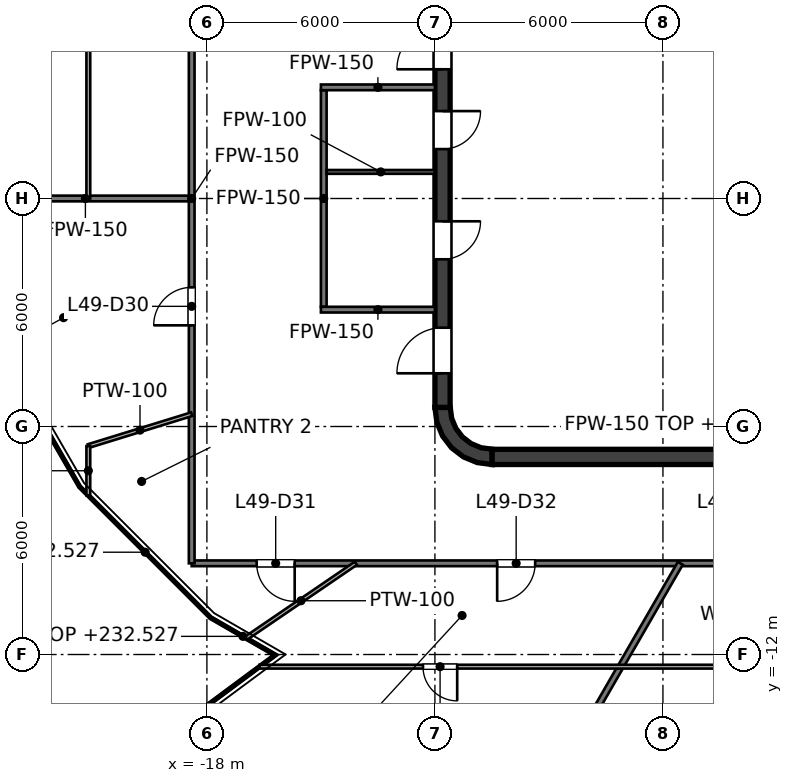
"""IFC4 building model, lengths in metres.
Left out: names, types, materials, properties, quantities, classifications, styles, units other than length and angle.
Written with IfcOpenShell. Run it as: python <this file> out.ifc"""

import sys

from ifc_helpers import new_model, si_unit, direction, frame, frame_2d, origin, place, context, subcontext, project, spatial, polyline, rectangle, outline, extrude, element, fill, save


model = new_model("IFC4")
c1 = context("Model", 3, precision=1e-05, world=origin(), true_north=direction((0.0, 1.0)))
c2 = subcontext(c1, "Body", "Model", "MODEL_VIEW")
j1 = project(units=[si_unit("LENGTHUNIT", "METRE"), si_unit("PLANEANGLEUNIT", "RADIAN")], contexts=[c1])
p1 = place(None, origin())
s1 = spatial("IfcSite", under=j1, at=p1, CompositionType="ELEMENT")
p2 = place(p1, origin())
s2 = spatial("IfcBuilding", under=s1, at=p2, CompositionType="ELEMENT")
p3 = place(p2, frame((0.0, 0.0, 229.6)))
s3 = spatial("IfcBuildingStorey", under=s2, at=p3, CompositionType="ELEMENT", Elevation=229.6)
p4 = place(p3, frame((-10.5, -6.8, 0.0), z_axis=(0.0, 0.0, 1.0), x_axis=(1.0, 0.0, 0.0)))
e1 = element("IfcWall", 1, at=p4, inside=s3, PredefinedType="SHEAR", context=c2, shape_type="SweptSolid", body=[
    extrude(rectangle(XDim=21.0, YDim=0.4, at=frame_2d((10.5, 0.0))), origin(), (0.0, 0.0, 1.0), 4.0),
])
p5 = place(p3, frame((-11.8, -5.5, 0.0), z_axis=(0.0, 0.0, 1.0), x_axis=(0.0, 1.0, 0.0)))
e2 = element("IfcWall", 2, at=p5, inside=s3, PredefinedType="SHEAR", context=c2, shape_type="SweptSolid", body=[
    extrude(rectangle(XDim=11.0, YDim=0.4, at=frame_2d((5.5, 0.0))), origin(), (0.0, 0.0, 1.0), 4.0),
])
p6 = place(p5, frame((3.9, 0.0, 0.0)))
e3 = element("IfcOpeningElement", 3, at=p6, cuts=e2, PredefinedType="OPENING", context=c2, shape_type="SweptSolid", body=[
    extrude(rectangle(XDim=1.0, YDim=2.1, at=frame_2d((0.5, 1.05))), frame((0.0, 0.2, 0.0), z_axis=(0.0, -1.0, 0.0), x_axis=(1.0, 0.0, 0.0)), (0.0, 0.0, 1.0), 0.4),
])
p7 = place(p5, frame((6.8, 0.0, 0.0)))
e4 = element("IfcOpeningElement", 4, at=p7, cuts=e2, PredefinedType="OPENING", context=c2, shape_type="SweptSolid", body=[
    extrude(rectangle(XDim=1.0, YDim=2.1, at=frame_2d((0.5, 1.05))), frame((0.0, 0.2, 0.0), z_axis=(0.0, -1.0, 0.0), x_axis=(1.0, 0.0, 0.0)), (0.0, 0.0, 1.0), 0.4),
])
p8 = place(p5, frame((0.9, 0.0, 0.0)))
e5 = element("IfcOpeningElement", 5, at=p8, cuts=e2, PredefinedType="OPENING", context=c2, shape_type="SweptSolid", body=[
    extrude(rectangle(XDim=1.2, YDim=2.1, at=frame_2d((0.6, 1.05))), frame((0.0, 0.2, 0.0), z_axis=(0.0, -1.0, 0.0), x_axis=(1.0, 0.0, 0.0)), (0.0, 0.0, 1.0), 0.4),
])
p9 = place(p5, frame((8.9, 0.0, 0.0)))
e6 = element("IfcOpeningElement", 6, at=p9, cuts=e2, PredefinedType="OPENING", context=c2, shape_type="SweptSolid", body=[
    extrude(rectangle(XDim=1.2, YDim=2.1, at=frame_2d((0.6, 1.05))), frame((0.0, 0.2, 0.0), z_axis=(0.0, -1.0, 0.0), x_axis=(1.0, 0.0, 0.0)), (0.0, 0.0, 1.0), 0.4),
])
p10 = place(p3, origin())
e7 = element("IfcWall", 7, at=p10, inside=s3, PredefinedType="SHEAR", context=c2, shape_type="SweptSolid", body=[
    extrude(outline(polyline([(-10.5, -7.0), (-10.5, -6.596), (-10.784, -6.559), (-11.048, -6.45), (-11.275, -6.275), (-11.45, -6.048), (-11.559, -5.784), (-11.596, -5.5), (-12.0, -5.5), (-11.949, -5.888), (-11.799, -6.25), (-11.561, -6.561), (-11.25, -6.799), (-10.888, -6.949), (-10.5, -7.0)])), origin(), (0.0, 0.0, 1.0), 4.0),
])
p11 = place(p3, frame((-9.0, -6.6, 0.0), z_axis=(0.0, 0.0, 1.0), x_axis=(0.0, 1.0, 0.0)))
e8 = element("IfcWall", 8, at=p11, inside=s3, PredefinedType="PARTITIONING", context=c2, shape_type="SweptSolid", body=[
    extrude(rectangle(XDim=2.5, YDim=0.25, at=frame_2d((1.25, 0.0))), origin(), (0.0, 0.0, 1.0), 3.85),
])
p12 = place(p11, frame((0.75, 0.0, 0.0)))
e9 = element("IfcOpeningElement", 9, at=p12, cuts=e8, PredefinedType="OPENING", context=c2, shape_type="SweptSolid", body=[
    extrude(rectangle(XDim=1.0, YDim=2.1, at=frame_2d((0.5, 1.05))), frame((0.0, 0.125, 0.0), z_axis=(0.0, -1.0, 0.0), x_axis=(1.0, 0.0, 0.0)), (0.0, 0.0, 1.0), 0.25),
])
p13 = place(p3, frame((-9.125, 1.525, 0.0), z_axis=(0.0, 0.0, 1.0), x_axis=(1.0, 0.0, 0.0)))
e10 = element("IfcWall", 10, at=p13, inside=s3, PredefinedType="SOLIDWALL", context=c2, shape_type="SweptSolid", body=[
    extrude(rectangle(XDim=8.35, YDim=0.25, at=frame_2d((4.175, 0.0))), origin(), (0.0, 0.0, 1.0), 3.85),
])
p14 = place(p13, frame((0.925, 0.0, 0.0)))
e11 = element("IfcOpeningElement", 11, at=p14, cuts=e10, PredefinedType="OPENING", context=c2, shape_type="SweptSolid", body=[
    extrude(rectangle(XDim=1.1, YDim=2.1, at=frame_2d((0.55, 1.05))), frame((0.0, 0.125, 0.0), z_axis=(0.0, -1.0, 0.0), x_axis=(1.0, 0.0, 0.0)), (0.0, 0.0, 1.0), 0.25),
])
p15 = place(p13, frame((3.625, 0.0, 0.0)))
e12 = element("IfcOpeningElement", 12, at=p15, cuts=e10, PredefinedType="OPENING", context=c2, shape_type="SweptSolid", body=[
    extrude(rectangle(XDim=1.1, YDim=2.1, at=frame_2d((0.55, 1.05))), frame((0.0, 0.125, 0.0), z_axis=(0.0, -1.0, 0.0), x_axis=(1.0, 0.0, 0.0)), (0.0, 0.0, 1.0), 0.25),
])
p16 = place(p13, frame((6.325, 0.0, 0.0)))
e13 = element("IfcOpeningElement", 13, at=p16, cuts=e10, PredefinedType="OPENING", context=c2, shape_type="SweptSolid", body=[
    extrude(rectangle(XDim=1.1, YDim=2.1, at=frame_2d((0.55, 1.05))), frame((0.0, 0.125, 0.0), z_axis=(0.0, -1.0, 0.0), x_axis=(1.0, 0.0, 0.0)), (0.0, 0.0, 1.0), 0.25),
])
for number, where, z_axis, x_axis in (
    (14, (-9.0, 1.65, 0.0), (0.0, 0.0, 1.0), (0.0, 1.0, 0.0)),
    (15, (-6.3, 1.65, 0.0), (0.0, 0.0, 1.0), (0.0, 1.0, 0.0)),
):
    element("IfcWall", number, at=place(p3, frame(where, z_axis=z_axis, x_axis=x_axis)), inside=s3, PredefinedType="SOLIDWALL", context=c2, shape_type="SweptSolid", body=[
        extrude(rectangle(XDim=2.2, YDim=0.25, at=frame_2d((1.1, 0.0))), origin(), (0.0, 0.0, 1.0), 3.85),
    ])
p17 = place(p3, frame((-9.125, -1.525, 0.0), z_axis=(0.0, 0.0, 1.0), x_axis=(1.0, 0.0, 0.0)))
e16 = element("IfcWall", 16, at=p17, inside=s3, PredefinedType="SOLIDWALL", context=c2, shape_type="SweptSolid", body=[
    extrude(rectangle(XDim=18.25, YDim=0.25, at=frame_2d((9.125, 0.0))), origin(), (0.0, 0.0, 1.0), 3.85),
])
p18 = place(p17, frame((7.15, 0.0, 0.0)))
e17 = element("IfcOpeningElement", 17, at=p18, cuts=e16, PredefinedType="OPENING", context=c2, shape_type="SweptSolid", body=[
    extrude(rectangle(XDim=1.2, YDim=2.1, at=frame_2d((0.6, 1.05))), frame((0.0, 0.125, 0.0), z_axis=(0.0, -1.0, 0.0), x_axis=(1.0, 0.0, 0.0)), (0.0, 0.0, 1.0), 0.25),
])
p19 = place(p17, frame((10.2, 0.0, 0.0)))
e18 = element("IfcOpeningElement", 18, at=p19, cuts=e16, PredefinedType="OPENING", context=c2, shape_type="SweptSolid", body=[
    extrude(rectangle(XDim=1.2, YDim=2.1, at=frame_2d((0.6, 1.05))), frame((0.0, 0.125, 0.0), z_axis=(0.0, -1.0, 0.0), x_axis=(1.0, 0.0, 0.0)), (0.0, 0.0, 1.0), 0.25),
])
p20 = place(p17, frame((16.075, 0.0, 0.0)))
e19 = element("IfcOpeningElement", 19, at=p20, cuts=e16, PredefinedType="OPENING", context=c2, shape_type="SweptSolid", body=[
    extrude(rectangle(XDim=1.0, YDim=2.1, at=frame_2d((0.5, 1.05))), frame((0.0, 0.125, 0.0), z_axis=(0.0, -1.0, 0.0), x_axis=(1.0, 0.0, 0.0)), (0.0, 0.0, 1.0), 0.25),
])
p21 = place(p3, frame((-9.125, -3.975, 0.0), z_axis=(0.0, 0.0, 1.0), x_axis=(1.0, 0.0, 0.0)))
e20 = element("IfcWall", 20, at=p21, inside=s3, PredefinedType="SOLIDWALL", context=c2, shape_type="SweptSolid", body=[
    extrude(rectangle(XDim=12.4, YDim=0.25, at=frame_2d((6.2, 0.0))), origin(), (0.0, 0.0, 1.0), 3.85),
])
p22 = place(p21, frame((1.05, 0.0, 0.0)))
e21 = element("IfcOpeningElement", 21, at=p22, cuts=e20, PredefinedType="OPENING", context=c2, shape_type="SweptSolid", body=[
    extrude(rectangle(XDim=1.2, YDim=2.1, at=frame_2d((0.6, 1.05))), frame((0.0, 0.125, 0.0), z_axis=(0.0, -1.0, 0.0), x_axis=(1.0, 0.0, 0.0)), (0.0, 0.0, 1.0), 0.25),
])
p23 = place(p21, frame((4.1, 0.0, 0.0)))
e22 = element("IfcOpeningElement", 22, at=p23, cuts=e20, PredefinedType="OPENING", context=c2, shape_type="SweptSolid", body=[
    extrude(rectangle(XDim=1.2, YDim=2.1, at=frame_2d((0.6, 1.05))), frame((0.0, 0.125, 0.0), z_axis=(0.0, -1.0, 0.0), x_axis=(1.0, 0.0, 0.0)), (0.0, 0.0, 1.0), 0.25),
])
for number, where, z_axis, x_axis in (
    (23, (-9.0, -3.85, 0.0), (0.0, 0.0, 1.0), (0.0, 1.0, 0.0)),
    (24, (-5.95, -3.85, 0.0), (0.0, 0.0, 1.0), (0.0, 1.0, 0.0)),
):
    element("IfcWall", number, at=place(p3, frame(where, z_axis=z_axis, x_axis=x_axis)), inside=s3, PredefinedType="SOLIDWALL", context=c2, shape_type="SweptSolid", body=[
        extrude(rectangle(XDim=2.2, YDim=0.25, at=frame_2d((1.1, 0.0))), origin(), (0.0, 0.0, 1.0), 3.85),
    ])
p24 = place(p3, frame((-14.925, -2.85, 0.0), z_axis=(0.0, 0.0, 1.0), x_axis=(0.0, 1.0, 0.0)))
e25 = element("IfcWall", 25, at=p24, inside=s3, PredefinedType="PARTITIONING", context=c2, shape_type="SweptSolid", body=[
    extrude(rectangle(XDim=5.7, YDim=0.15, at=frame_2d((2.85, 0.0))), origin(), (0.0, 0.0, 1.0), 2.918),
])
for number, where, z_axis, x_axis in (
    (26, (-15.0, 2.925, 0.0), (0.0, 0.0, 1.0), (1.0, 0.0, 0.0)),
    (27, (-15.0, -2.925, 0.0), (0.0, 0.0, 1.0), (1.0, 0.0, 0.0)),
):
    element("IfcWall", number, at=place(p3, frame(where, z_axis=z_axis, x_axis=x_axis)), inside=s3, PredefinedType="PARTITIONING", context=c2, shape_type="SweptSolid", body=[
        extrude(rectangle(XDim=3.0, YDim=0.15, at=frame_2d((1.5, 0.0))), origin(), (0.0, 0.0, 1.0), 2.918),
    ])
p25 = place(p3, frame((-14.85, 0.7, 0.0), z_axis=(0.0, 0.0, 1.0), x_axis=(1.0, 0.0, 0.0)))
e28 = element("IfcWall", 28, at=p25, inside=s3, PredefinedType="PARTITIONING", context=c2, shape_type="SweptSolid", body=[
    extrude(rectangle(XDim=2.85, YDim=0.1, at=frame_2d((1.425, 0.0))), origin(), (0.0, 0.0, 1.0), 2.918),
])
p26 = place(p3, frame((-18.4, -9.6, 0.0), z_axis=(0.0, 0.0, 1.0), x_axis=(1.0, 0.0, 0.0)))
e29 = element("IfcWall", 29, at=p26, inside=s3, PredefinedType="PARTITIONING", context=c2, shape_type="SweptSolid", body=[
    extrude(rectangle(XDim=36.8, YDim=0.15, at=frame_2d((18.4, 0.0))), origin(), (0.0, 0.0, 1.0), 2.927),
])
p27 = place(p26, frame((13.866, 0.0, 0.0)))
e30 = element("IfcOpeningElement", 30, at=p27, cuts=e29, PredefinedType="OPENING", context=c2, shape_type="SweptSolid", body=[
    extrude(rectangle(XDim=1.0, YDim=2.1, at=frame_2d((0.5, 1.05))), frame((0.0, 0.075, 0.0), z_axis=(0.0, -1.0, 0.0), x_axis=(1.0, 0.0, 0.0)), (0.0, 0.0, 1.0), 0.15),
])
p28 = place(p26, frame((18.999, 0.0, 0.0)))
e31 = element("IfcOpeningElement", 31, at=p28, cuts=e29, PredefinedType="OPENING", context=c2, shape_type="SweptSolid", body=[
    extrude(rectangle(XDim=1.0, YDim=2.1, at=frame_2d((0.5, 1.05))), frame((0.0, 0.075, 0.0), z_axis=(0.0, -1.0, 0.0), x_axis=(1.0, 0.0, 0.0)), (0.0, 0.0, 1.0), 0.15),
])
p29 = place(p26, frame((25.061, 0.0, 0.0)))
e32 = element("IfcOpeningElement", 32, at=p29, cuts=e29, PredefinedType="OPENING", context=c2, shape_type="SweptSolid", body=[
    extrude(rectangle(XDim=1.0, YDim=2.1, at=frame_2d((0.5, 1.05))), frame((0.0, 0.075, 0.0), z_axis=(0.0, -1.0, 0.0), x_axis=(1.0, 0.0, 0.0)), (0.0, 0.0, 1.0), 0.15),
])
p30 = place(p26, frame((31.951, 0.0, 0.0)))
e33 = element("IfcOpeningElement", 33, at=p30, cuts=e29, PredefinedType="OPENING", context=c2, shape_type="SweptSolid", body=[
    extrude(rectangle(XDim=1.0, YDim=2.1, at=frame_2d((0.5, 1.05))), frame((0.0, 0.075, 0.0), z_axis=(0.0, -1.0, 0.0), x_axis=(1.0, 0.0, 0.0)), (0.0, 0.0, 1.0), 0.15),
])
p31 = place(p26, frame((1.71, 0.0, 0.0)))
e34 = element("IfcOpeningElement", 34, at=p31, cuts=e29, PredefinedType="OPENING", context=c2, shape_type="SweptSolid", body=[
    extrude(rectangle(XDim=1.0, YDim=2.1, at=frame_2d((0.5, 1.05))), frame((0.0, 0.075, 0.0), z_axis=(0.0, -1.0, 0.0), x_axis=(1.0, 0.0, 0.0)), (0.0, 0.0, 1.0), 0.15),
])
p32 = place(p26, frame((8.038, 0.0, 0.0)))
e35 = element("IfcOpeningElement", 35, at=p32, cuts=e29, PredefinedType="OPENING", context=c2, shape_type="SweptSolid", body=[
    extrude(rectangle(XDim=1.0, YDim=2.1, at=frame_2d((0.5, 1.05))), frame((0.0, 0.075, 0.0), z_axis=(0.0, -1.0, 0.0), x_axis=(1.0, 0.0, 0.0)), (0.0, 0.0, 1.0), 0.15),
])
p33 = place(p3, frame((-23.994, 0.0, 0.0), z_axis=(0.0, 0.0, 1.0), x_axis=(1.0, 0.0, 0.0)))
e36 = element("IfcWall", 36, at=p33, inside=s3, PredefinedType="PARTITIONING", context=c2, shape_type="SweptSolid", body=[
    extrude(rectangle(XDim=5.594, YDim=0.15, at=frame_2d((2.797, 0.0))), origin(), (0.0, 0.0, 1.0), 2.918),
])
p34 = place(p3, frame((-12.15, -21.044, 0.0), z_axis=(0.0, 0.0, 1.0), x_axis=(0.499954356739, 0.86605175433, 0.0)))
e37 = element("IfcWall", 37, at=p34, inside=s3, PredefinedType="PARTITIONING", context=c2, shape_type="SweptSolid", body=[
    extrude(rectangle(XDim=13.214, YDim=0.15, at=frame_2d((6.607, 0.0))), origin(), (0.0, 0.0, 1.0), 3.302),
])
p35 = place(p3, frame((-18.4, -9.6, 0.0), z_axis=(0.0, 0.0, 1.0), x_axis=(0.0, 1.0, 0.0)))
e38 = element("IfcWall", 38, at=p35, inside=s3, PredefinedType="PARTITIONING", context=c2, shape_type="SweptSolid", body=[
    extrude(rectangle(XDim=19.2, YDim=0.15, at=frame_2d((9.6, 0.0))), origin(), (0.0, 0.0, 1.0), 2.918),
])
p36 = place(p35, frame((13.849, 0.0, 0.0)))
e39 = element("IfcOpeningElement", 39, at=p36, cuts=e38, PredefinedType="OPENING", context=c2, shape_type="SweptSolid", body=[
    extrude(rectangle(XDim=1.0, YDim=2.1, at=frame_2d((0.5, 1.05))), frame((0.0, 0.075, 0.0), z_axis=(0.0, -1.0, 0.0), x_axis=(1.0, 0.0, 0.0)), (0.0, 0.0, 1.0), 0.15),
])
p37 = place(p35, frame((6.262, 0.0, 0.0)))
e40 = element("IfcOpeningElement", 40, at=p37, cuts=e38, PredefinedType="OPENING", context=c2, shape_type="SweptSolid", body=[
    extrude(rectangle(XDim=1.0, YDim=2.1, at=frame_2d((0.5, 1.05))), frame((0.0, 0.075, 0.0), z_axis=(0.0, -1.0, 0.0), x_axis=(1.0, 0.0, 0.0)), (0.0, 0.0, 1.0), 0.15),
])
p38 = place(p3, frame((-23.204, -4.371, 0.0), z_axis=(0.0, 0.0, 1.0), x_axis=(0.500003477455, -0.866023396066, 0.0)))
e41 = element("IfcWall", 41, at=p38, inside=s3, PredefinedType="PARTITIONING", context=c2, shape_type="SweptSolid", body=[
    extrude(rectangle(XDim=3.71, YDim=0.05, at=frame_2d((1.855, 0.0))), origin(), (0.0, 0.0, 1.0), 2.918),
])
p39 = place(p3, frame((-21.349, -7.584, 0.0), z_axis=(0.0, 0.0, 1.0), x_axis=(0.70713181373, -0.707081747757, 0.0)))
e42 = element("IfcWall", 42, at=p39, inside=s3, PredefinedType="PARTITIONING", context=c2, shape_type="SweptSolid", body=[
    extrude(rectangle(XDim=4.876, YDim=0.05, at=frame_2d((2.438, 0.0))), origin(), (0.0, 0.0, 1.0), 2.927),
])
p40 = place(p3, frame((-17.901, -11.032, 0.0), z_axis=(0.0, 0.0, 1.0), x_axis=(0.866137951632, -0.499805010722, 0.0)))
e43 = element("IfcWall", 43, at=p40, inside=s3, PredefinedType="PARTITIONING", context=c2, shape_type="SweptSolid", body=[
    extrude(rectangle(XDim=1.963, YDim=0.05, at=frame_2d((0.981, 0.0))), origin(), (0.0, 0.0, 1.0), 2.927),
])
p41 = place(p3, frame((-21.892, -16.233, 0.0), z_axis=(0.0, 0.0, 1.0), x_axis=(0.803267144232, 0.595618917595, 0.0)))
e44 = element("IfcWall", 44, at=p41, inside=s3, PredefinedType="PARTITIONING", context=c2, shape_type="SweptSolid", body=[
    extrude(rectangle(XDim=7.085, YDim=0.05, at=frame_2d((3.542, 0.0))), origin(), (0.0, 0.0, 1.0), 2.927),
])
p42 = place(p3, frame((-16.615, -12.32, 0.0), z_axis=(0.0, 0.0, 1.0), x_axis=(1.0, 0.0, 0.0)))
e45 = element("IfcWall", 45, at=p42, inside=s3, PredefinedType="PARTITIONING", context=c2, shape_type="SweptSolid", body=[
    extrude(rectangle(XDim=37.735, YDim=0.1, at=frame_2d((18.868, 0.0))), origin(), (0.0, 0.0, 1.0), 2.927),
])
p43 = place(p42, frame((17.19, 0.0, 0.0)))
e46 = element("IfcOpeningElement", 46, at=p43, cuts=e45, PredefinedType="OPENING", context=c2, shape_type="SweptSolid", body=[
    extrude(rectangle(XDim=1.8, YDim=2.1, at=frame_2d((0.9, 1.05))), frame((0.0, 0.05, 0.0), z_axis=(0.0, -1.0, 0.0), x_axis=(1.0, 0.0, 0.0)), (0.0, 0.0, 1.0), 0.1),
])
p44 = place(p42, frame((4.301, 0.0, 0.0)))
e47 = element("IfcOpeningElement", 47, at=p44, cuts=e45, PredefinedType="OPENING", context=c2, shape_type="SweptSolid", body=[
    extrude(rectangle(XDim=0.9, YDim=2.1, at=frame_2d((0.45, 1.05))), frame((0.0, 0.05, 0.0), z_axis=(0.0, -1.0, 0.0), x_axis=(1.0, 0.0, 0.0)), (0.0, 0.0, 1.0), 0.1),
])
p45 = place(p3, frame((-21.12, -6.515, 0.0), z_axis=(0.0, 0.0, 1.0), x_axis=(0.955593380923, 0.294688463189, 0.0)))
e48 = element("IfcWall", 48, at=p45, inside=s3, PredefinedType="PARTITIONING", context=c2, shape_type="SweptSolid", body=[
    extrude(rectangle(XDim=2.847, YDim=0.1, at=frame_2d((1.423, 0.0))), origin(), (0.0, 0.0, 1.0), 3.85),
])
p46 = place(p3, frame((-16.969, -11.57, 0.0), z_axis=(0.0, 0.0, 1.0), x_axis=(0.826104689434, 0.563516674194, 0.0)))
e49 = element("IfcWall", 49, at=p46, inside=s3, PredefinedType="PARTITIONING", context=c2, shape_type="SweptSolid", body=[
    extrude(rectangle(XDim=3.496, YDim=0.1, at=frame_2d((1.748, 0.0))), origin(), (0.0, 0.0, 1.0), 3.85),
])
p47 = place(p3, frame((-21.12, -7.813, 0.0), z_axis=(0.0, 0.0, 1.0), x_axis=(0.0, 1.0, 0.0)))
e50 = element("IfcWall", 50, at=p47, inside=s3, PredefinedType="PARTITIONING", context=c2, shape_type="SweptSolid", body=[
    extrude(rectangle(XDim=1.298, YDim=0.1, at=frame_2d((0.649, 0.0))), origin(), (0.0, 0.0, 1.0), 2.927),
])
p48 = place(p3, frame((-21.12, 0.0, 0.0), z_axis=(0.0, 0.0, 1.0), x_axis=(0.0, 1.0, 0.0)))
e51 = element("IfcWall", 51, at=p48, inside=s3, PredefinedType="PARTITIONING", context=c2, shape_type="SweptSolid", body=[
    extrude(rectangle(XDim=12.32, YDim=0.1, at=frame_2d((6.16, 0.0))), origin(), (0.0, 0.0, 1.0), 2.918),
])
p49 = place(p48, frame((5.21, 0.0, 0.0)))
e52 = element("IfcOpeningElement", 52, at=p49, cuts=e51, PredefinedType="OPENING", context=c2, shape_type="SweptSolid", body=[
    extrude(rectangle(XDim=1.8, YDim=2.1, at=frame_2d((0.9, 1.05))), frame((0.0, 0.05, 0.0), z_axis=(0.0, -1.0, 0.0), x_axis=(1.0, 0.0, 0.0)), (0.0, 0.0, 1.0), 0.1),
])
p50 = place(p14, origin())
e53 = element("IfcDoor", 53, at=p50, inside=s3, OperationType="DOUBLE_DOOR_SLIDING", PredefinedType="DOOR", context=c2, shape_type="SweptSolid", body=[
    extrude(rectangle(XDim=1.1, YDim=2.1, at=frame_2d((0.55, 1.05))), frame((0.0, 0.025, 0.0), z_axis=(0.0, -1.0, 0.0), x_axis=(1.0, 0.0, 0.0)), (0.0, 0.0, 1.0), 0.05),
])
fill(e11, e53)
p51 = place(p15, origin())
e54 = element("IfcDoor", 54, at=p51, inside=s3, OperationType="DOUBLE_DOOR_SLIDING", PredefinedType="DOOR", context=c2, shape_type="SweptSolid", body=[
    extrude(rectangle(XDim=1.1, YDim=2.1, at=frame_2d((0.55, 1.05))), frame((0.0, 0.025, 0.0), z_axis=(0.0, -1.0, 0.0), x_axis=(1.0, 0.0, 0.0)), (0.0, 0.0, 1.0), 0.05),
])
fill(e12, e54)
p52 = place(p22, origin())
e55 = element("IfcDoor", 55, at=p52, inside=s3, OperationType="DOUBLE_DOOR_SLIDING", PredefinedType="DOOR", context=c2, shape_type="SweptSolid", body=[
    extrude(rectangle(XDim=1.2, YDim=2.1, at=frame_2d((0.6, 1.05))), frame((0.0, 0.025, 0.0), z_axis=(0.0, -1.0, 0.0), x_axis=(1.0, 0.0, 0.0)), (0.0, 0.0, 1.0), 0.05),
])
fill(e21, e55)
p53 = place(p23, origin())
e56 = element("IfcDoor", 56, at=p53, inside=s3, OperationType="DOUBLE_DOOR_SLIDING", PredefinedType="DOOR", context=c2, shape_type="SweptSolid", body=[
    extrude(rectangle(XDim=1.2, YDim=2.1, at=frame_2d((0.6, 1.05))), frame((0.0, 0.025, 0.0), z_axis=(0.0, -1.0, 0.0), x_axis=(1.0, 0.0, 0.0)), (0.0, 0.0, 1.0), 0.05),
])
fill(e22, e56)
p54 = place(p12, origin())
e57 = element("IfcDoor", 57, at=p54, inside=s3, OperationType="SINGLE_SWING_LEFT", PredefinedType="DOOR", context=c2, shape_type="SweptSolid", body=[
    extrude(rectangle(XDim=1.0, YDim=2.1, at=frame_2d((0.5, 1.05))), frame((0.0, 0.025, 0.0), z_axis=(0.0, -1.0, 0.0), x_axis=(1.0, 0.0, 0.0)), (0.0, 0.0, 1.0), 0.05),
])
fill(e9, e57)
p55 = place(p6, origin())
e58 = element("IfcDoor", 58, at=p55, inside=s3, OperationType="SINGLE_SWING_RIGHT", PredefinedType="DOOR", context=c2, shape_type="SweptSolid", body=[
    extrude(rectangle(XDim=1.0, YDim=2.1, at=frame_2d((0.5, 1.05))), frame((0.0, 0.025, 0.0), z_axis=(0.0, -1.0, 0.0), x_axis=(1.0, 0.0, 0.0)), (0.0, 0.0, 1.0), 0.05),
])
fill(e3, e58)
p56 = place(p7, origin())
e59 = element("IfcDoor", 59, at=p56, inside=s3, OperationType="SINGLE_SWING_RIGHT", PredefinedType="DOOR", context=c2, shape_type="SweptSolid", body=[
    extrude(rectangle(XDim=1.0, YDim=2.1, at=frame_2d((0.5, 1.05))), frame((0.0, 0.025, 0.0), z_axis=(0.0, -1.0, 0.0), x_axis=(1.0, 0.0, 0.0)), (0.0, 0.0, 1.0), 0.05),
])
fill(e4, e59)
p57 = place(p8, origin())
e60 = element("IfcDoor", 60, at=p57, inside=s3, OperationType="SINGLE_SWING_LEFT", PredefinedType="DOOR", context=c2, shape_type="SweptSolid", body=[
    extrude(rectangle(XDim=1.2, YDim=2.1, at=frame_2d((0.6, 1.05))), frame((0.0, 0.025, 0.0), z_axis=(0.0, -1.0, 0.0), x_axis=(1.0, 0.0, 0.0)), (0.0, 0.0, 1.0), 0.05),
])
fill(e5, e60)
p58 = place(p9, origin())
e61 = element("IfcDoor", 61, at=p58, inside=s3, OperationType="SINGLE_SWING_LEFT", PredefinedType="DOOR", context=c2, shape_type="SweptSolid", body=[
    extrude(rectangle(XDim=1.2, YDim=2.1, at=frame_2d((0.6, 1.05))), frame((0.0, 0.025, 0.0), z_axis=(0.0, -1.0, 0.0), x_axis=(1.0, 0.0, 0.0)), (0.0, 0.0, 1.0), 0.05),
])
fill(e6, e61)
p59 = place(p37, origin())
e62 = element("IfcDoor", 62, at=p59, inside=s3, OperationType="SINGLE_SWING_LEFT", PredefinedType="DOOR", context=c2, shape_type="SweptSolid", body=[
    extrude(rectangle(XDim=1.0, YDim=2.1, at=frame_2d((0.5, 1.05))), frame((0.0, 0.025, 0.0), z_axis=(0.0, -1.0, 0.0), x_axis=(1.0, 0.0, 0.0)), (0.0, 0.0, 1.0), 0.05),
])
fill(e40, e62)
p60 = place(p31, origin())
e63 = element("IfcDoor", 63, at=p60, inside=s3, OperationType="SINGLE_SWING_RIGHT", PredefinedType="DOOR", context=c2, shape_type="SweptSolid", body=[
    extrude(rectangle(XDim=1.0, YDim=2.1, at=frame_2d((0.5, 1.05))), frame((0.0, 0.025, 0.0), z_axis=(0.0, -1.0, 0.0), x_axis=(1.0, 0.0, 0.0)), (0.0, 0.0, 1.0), 0.05),
])
fill(e34, e63)
p61 = place(p32, origin())
e64 = element("IfcDoor", 64, at=p61, inside=s3, OperationType="SINGLE_SWING_LEFT", PredefinedType="DOOR", context=c2, shape_type="SweptSolid", body=[
    extrude(rectangle(XDim=1.0, YDim=2.1, at=frame_2d((0.5, 1.05))), frame((0.0, 0.025, 0.0), z_axis=(0.0, -1.0, 0.0), x_axis=(1.0, 0.0, 0.0)), (0.0, 0.0, 1.0), 0.05),
])
fill(e35, e64)
p62 = place(p44, origin())
e65 = element("IfcDoor", 65, at=p62, inside=s3, OperationType="SINGLE_SWING_RIGHT", PredefinedType="DOOR", context=c2, shape_type="SweptSolid", body=[
    extrude(rectangle(XDim=0.9, YDim=2.1, at=frame_2d((0.45, 1.05))), frame((0.0, 0.025, 0.0), z_axis=(0.0, -1.0, 0.0), x_axis=(1.0, 0.0, 0.0)), (0.0, 0.0, 1.0), 0.05),
])
fill(e47, e65)
save(model, sys.argv[1])
